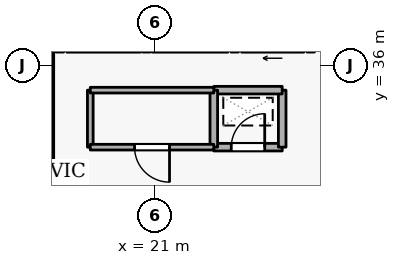
"""IFC4 building model, lengths in metres.
Left out: names, types, materials, properties, quantities, classifications, styles, units other than length and angle.
Written with IfcOpenShell. Run it as: python <this file> out.ifc"""

import sys

from ifc_helpers import new_model, si_unit, direction, frame, frame_2d, origin, place, context, subcontext, project, spatial, rectangle, extrude, element, fill, save


model = new_model("IFC4")
c1 = context("Model", 3, precision=1e-05, world=origin(), true_north=direction((0.0, 1.0)))
c2 = subcontext(c1, "Body", "Model", "MODEL_VIEW")
j1 = project(units=[si_unit("LENGTHUNIT", "METRE"), si_unit("PLANEANGLEUNIT", "RADIAN")], contexts=[c1])
p1 = place(None, origin())
s1 = spatial("IfcSite", under=j1, at=p1, CompositionType="ELEMENT")
p2 = place(p1, origin())
s2 = spatial("IfcBuilding", under=s1, at=p2, CompositionType="ELEMENT")
p3 = place(p2, frame((0.0, 0.0, 18.6)))
s3 = spatial("IfcBuildingStorey", under=s2, at=p3, CompositionType="ELEMENT", Elevation=18.6)
p4 = place(p3, frame((24.92, 36.45, 0.0), z_axis=(0.0, 0.0, 1.0), x_axis=(-1.0, 0.0, 0.0)))
e1 = element("IfcWall", 1, at=p4, inside=s3, PredefinedType="STANDARD", context=c2, shape_type="SweptSolid", body=[
    extrude(rectangle(XDim=1.64, YDim=0.2, at=frame_2d((0.82, 0.0))), origin(), (0.0, 0.0, 1.0), 4.16),
])
p5 = place(p4, frame((0.31, 0.0, 0.0)))
e2 = element("IfcOpeningElement", 2, at=p5, cuts=e1, PredefinedType="OPENING", context=c2, shape_type="SweptSolid", body=[
    extrude(rectangle(XDim=1.02, YDim=2.06, at=frame_2d((0.51, 1.03))), frame((0.0, 0.11, 0.0), z_axis=(0.0, -1.0, 0.0), x_axis=(1.0, 0.0, 0.0)), (0.0, 0.0, 1.0), 0.22),
])
p6 = place(p3, frame((22.92, 36.45, 0.0), z_axis=(0.0, 0.0, 1.0), x_axis=(-1.0, 0.0, 0.0)))
e3 = element("IfcWall", 3, at=p6, inside=s3, PredefinedType="STANDARD", context=c2, shape_type="SweptSolid", body=[
    extrude(rectangle(XDim=1.99, YDim=0.2, at=frame_2d((0.995, 0.0))), origin(), (0.0, 0.0, 1.0), 4.16),
])
p7 = place(p3, frame((20.62, 36.45, 0.0), z_axis=(0.0, 0.0, 1.0), x_axis=(-1.0, 0.0, 0.0)))
e4 = element("IfcWall", 4, at=p7, inside=s3, PredefinedType="STANDARD", context=c2, shape_type="SweptSolid", body=[
    extrude(rectangle(XDim=1.94, YDim=0.2, at=frame_2d((0.97, 0.0))), origin(), (0.0, 0.0, 1.0), 4.16),
])
p8 = place(p3, frame((22.55, 33.85, 0.0), z_axis=(0.0, 0.0, 1.0), x_axis=(1.0, 0.0, 0.0)))
e5 = element("IfcWall", 5, at=p8, inside=s3, PredefinedType="STANDARD", context=c2, shape_type="SweptSolid", body=[
    extrude(rectangle(XDim=1.8, YDim=0.2, at=frame_2d((0.9, 0.0))), origin(), (0.0, 0.0, 1.0), 4.16),
])
p9 = place(p8, frame((0.46, 0.0, 0.0)))
e6 = element("IfcOpeningElement", 6, at=p9, cuts=e5, PredefinedType="OPENING", context=c2, shape_type="SweptSolid", body=[
    extrude(rectangle(XDim=0.88, YDim=2.04, at=frame_2d((0.44, 1.02))), frame((0.0, 0.11, 0.0), z_axis=(0.0, -1.0, 0.0), x_axis=(1.0, 0.0, 0.0)), (0.0, 0.0, 1.0), 0.22),
])
p10 = place(p3, frame((24.35, 33.85, 0.0), z_axis=(0.0, 0.0, 1.0), x_axis=(0.0, 1.0, 0.0)))
e7 = element("IfcWall", 7, at=p10, inside=s3, PredefinedType="STANDARD", context=c2, shape_type="SweptSolid", body=[
    extrude(rectangle(XDim=1.5, YDim=0.2, at=frame_2d((0.75, 0.0))), origin(), (0.0, 0.0, 1.0), 4.16),
])
p11 = place(p3, frame((24.35, 35.35, 0.0), z_axis=(0.0, 0.0, 1.0), x_axis=(-1.0, 0.0, 0.0)))
e8 = element("IfcWall", 8, at=p11, inside=s3, PredefinedType="STANDARD", context=c2, shape_type="SweptSolid", body=[
    extrude(rectangle(XDim=1.8, YDim=0.2, at=frame_2d((0.9, 0.0))), origin(), (0.0, 0.0, 1.0), 4.16),
])
p12 = place(p3, frame((22.55, 35.35, 0.0), z_axis=(0.0, 0.0, 1.0), x_axis=(0.0, -1.0, 0.0)))
e9 = element("IfcWall", 9, at=p12, inside=s3, PredefinedType="STANDARD", context=c2, shape_type="SweptSolid", body=[
    extrude(rectangle(XDim=1.5, YDim=0.2, at=frame_2d((0.75, 0.0))), origin(), (0.0, 0.0, 1.0), 4.16),
])
p13 = place(p3, frame((19.3, 33.85, 0.0), z_axis=(0.0, 0.0, 1.0), x_axis=(0.0, 1.0, 0.0)))
e10 = element("IfcWall", 10, at=p13, inside=s3, PredefinedType="PARTITIONING", context=c2, shape_type="SweptSolid", body=[
    extrude(rectangle(XDim=1.5, YDim=0.15, at=frame_2d((0.75, 0.0))), origin(), (0.0, 0.0, 1.0), 4.16),
])
p14 = place(p3, frame((19.3, 35.35, 0.0), z_axis=(0.0, 0.0, 1.0), x_axis=(1.0, 0.0, 0.0)))
e11 = element("IfcWall", 11, at=p14, inside=s3, PredefinedType="PARTITIONING", context=c2, shape_type="SweptSolid", body=[
    extrude(rectangle(XDim=3.25, YDim=0.15, at=frame_2d((1.625, 0.0))), origin(), (0.0, 0.0, 1.0), 4.16),
])
p15 = place(p3, frame((22.55, 33.85, 0.0), z_axis=(0.0, 0.0, 1.0), x_axis=(-1.0, 0.0, 0.0)))
e12 = element("IfcWall", 12, at=p15, inside=s3, PredefinedType="PARTITIONING", context=c2, shape_type="SweptSolid", body=[
    extrude(rectangle(XDim=3.25, YDim=0.15, at=frame_2d((1.625, 0.0))), origin(), (0.0, 0.0, 1.0), 4.16),
])
p16 = place(p15, frame((1.165, 0.0, 0.0)))
e13 = element("IfcOpeningElement", 13, at=p16, cuts=e12, PredefinedType="OPENING", context=c2, shape_type="SweptSolid", body=[
    extrude(rectangle(XDim=0.92, YDim=2.08, at=frame_2d((0.46, 1.04))), frame((0.0, 0.085, 0.0), z_axis=(0.0, -1.0, 0.0), x_axis=(1.0, 0.0, 0.0)), (0.0, 0.0, 1.0), 0.17),
])
p17 = place(p9, origin())
e14 = element("IfcDoor", 14, at=p17, inside=s3, OperationType="SINGLE_SWING_RIGHT", PredefinedType="DOOR", context=c2, shape_type="SweptSolid", body=[
    extrude(rectangle(XDim=0.88, YDim=2.04, at=frame_2d((0.44, 1.02))), frame((0.0, 0.025, 0.0), z_axis=(0.0, -1.0, 0.0), x_axis=(1.0, 0.0, 0.0)), (0.0, 0.0, 1.0), 0.05),
])
fill(e6, e14)
p18 = place(p16, origin())
e15 = element("IfcDoor", 15, at=p18, inside=s3, OperationType="SINGLE_SWING_LEFT", PredefinedType="DOOR", context=c2, shape_type="SweptSolid", body=[
    extrude(rectangle(XDim=0.92, YDim=2.08, at=frame_2d((0.46, 1.04))), frame((0.0, 0.025, 0.0), z_axis=(0.0, -1.0, 0.0), x_axis=(1.0, 0.0, 0.0)), (0.0, 0.0, 1.0), 0.05),
])
fill(e13, e15)
save(model, sys.argv[1])
